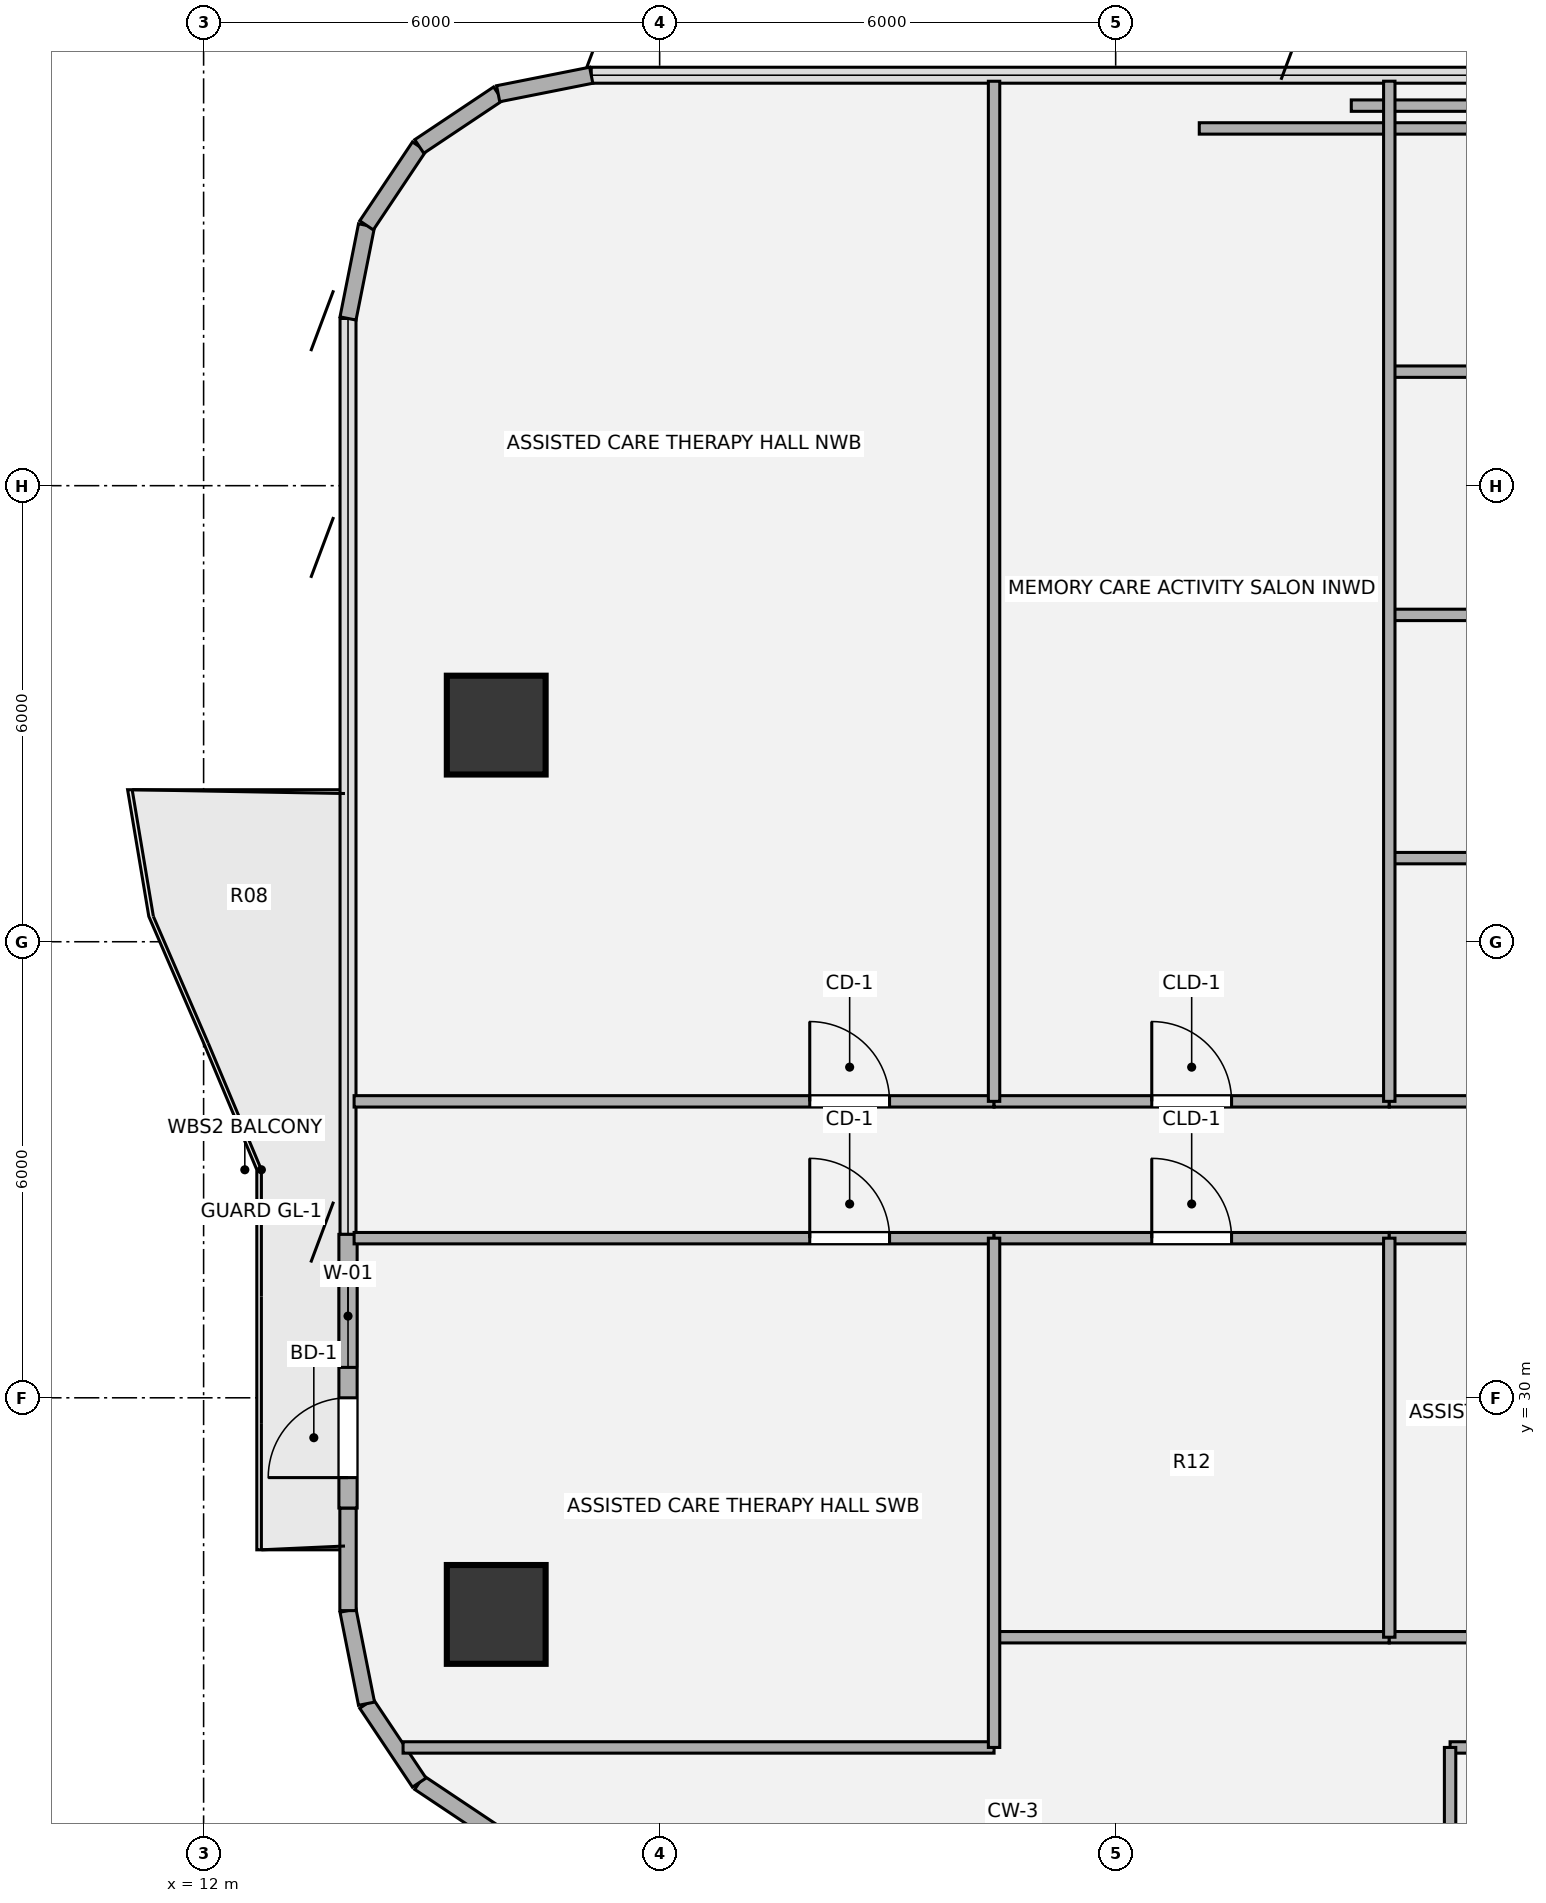
"""IFC4 building model, lengths in metres.
Left out: names, types, materials, properties, quantities, classifications, styles, units other than length and angle.
Written with IfcOpenShell. Run it as: python <this file> out.ifc"""

import sys

from ifc_helpers import new_model, si_unit, direction, frame, frame_2d, origin, origin_2d, place, context, subcontext, project, spatial, rectangle, hollow_circle, extrude, source, transform, mapped, element, fill, save


model = new_model("IFC4")
c1 = context("Model", 3, precision=1e-05, world=origin(), true_north=direction((0.0, 1.0)))
c2 = subcontext(c1, "Body", "Model", "MODEL_VIEW")
j1 = project(units=[si_unit("LENGTHUNIT", "METRE"), si_unit("PLANEANGLEUNIT", "RADIAN")], contexts=[c1])
p1 = place(None, origin())
s1 = spatial("IfcSite", under=j1, at=p1, CompositionType="ELEMENT")
p2 = place(p1, origin())
s2 = spatial("IfcBuilding", under=s1, at=p2, CompositionType="ELEMENT")
p3 = place(p2, frame((0.0, 0.0, 101.16)))
s3 = spatial("IfcBuildingStorey", under=s2, at=p3, CompositionType="ELEMENT", Elevation=101.16)
m1 = source(origin(), c2, "Body", "SweptSolid", [
    extrude(hollow_circle(Radius=0.65, WallThickness=0.045, at=origin_2d()), origin(), (0.0, 0.0, 1.0), 3.78),
])
for number, where, z_axis, x_axis in (
    (1, (15.85, 27.15, 0.0), (0.0, 0.0, 1.0), (1.0, 0.0, 0.0)),
    (2, (15.85, 38.85, 0.0), (0.0, 0.0, 1.0), (1.0, 0.0, 0.0)),
):
    element("IfcColumn", number, at=place(p3, frame(where, z_axis=z_axis, x_axis=x_axis)), inside=s3, PredefinedType="COLUMN", context=c2, shape_type="MappedRepresentation", body=[
        mapped(m1, transform((0.0, 0.0, 0.0), x_axis=(1.0, 0.0, 0.0), y_axis=(0.0, 1.0, 0.0), z_axis=(0.0, 0.0, 1.0), scale=1.0)),
    ])
for number, where, z_axis, x_axis in (
    (3, (15.875, 24.244, 0.0), (0.0, 0.0, 1.0), (-0.831, 0.556, 0.0)),
    (4, (14.837, 24.937, 0.0), (0.0, 0.0, 1.0), (-0.556, 0.831, 0.0)),
    (5, (14.144, 25.975, 0.0), (0.0, 0.0, 1.0), (-0.195, 0.981, 0.0)),
):
    element("IfcWall", number, at=place(p3, frame(where, z_axis=z_axis, x_axis=x_axis)), inside=s3, PredefinedType="SOLIDWALL", context=c2, shape_type="SweptSolid", body=[
        extrude(rectangle(XDim=1.249, YDim=0.215, at=frame_2d((0.624, 0.0))), origin(), (0.0, 0.0, 1.0), 3.53),
    ])
p4 = place(p3, frame((13.9, 27.2, 0.0), z_axis=(0.0, 0.0, 1.0), x_axis=(0.0, 1.0, 0.0)))
e6 = element("IfcWall", 6, at=p4, inside=s3, PredefinedType="SOLIDWALL", context=c2, shape_type="SweptSolid", body=[
    extrude(rectangle(XDim=1.35, YDim=0.215, at=frame_2d((0.675, 0.0))), origin(), (0.0, 0.0, 1.0), 3.53),
])
p5 = place(p3, frame((13.9, 28.55, 0.0), z_axis=(0.0, 0.0, 1.0), x_axis=(0.0, 1.0, 0.0)))
e7 = element("IfcWall", 7, at=p5, inside=s3, PredefinedType="SOLIDWALL", context=c2, shape_type="SweptSolid", body=[
    extrude(rectangle(XDim=3.6, YDim=0.24, at=frame_2d((1.8, 0.0))), origin(), (0.0, 0.0, 1.0), 3.53),
])
p6 = place(p5, frame((0.4, 0.0, 0.0)))
e8 = element("IfcOpeningElement", 8, at=p6, cuts=e7, PredefinedType="OPENING", context=c2, shape_type="SweptSolid", body=[
    extrude(rectangle(XDim=1.05, YDim=2.15, at=origin_2d()), frame((0.525, 0.13, 1.075), z_axis=(0.0, -1.0, 0.0), x_axis=(1.0, 0.0, 0.0)), (0.0, 0.0, 1.0), 0.26),
])
p7 = place(p5, frame((1.85, 0.0, 0.85)))
e9 = element("IfcOpeningElement", 9, at=p7, cuts=e7, PredefinedType="OPENING", context=c2, shape_type="SweptSolid", body=[
    extrude(rectangle(XDim=1.35, YDim=1.35, at=origin_2d()), frame((0.675, 0.13, 0.675), z_axis=(0.0, -1.0, 0.0), x_axis=(1.0, 0.0, 0.0)), (0.0, 0.0, 1.0), 0.26),
])
for number, where, z_axis, x_axis in (
    (10, (13.9, 44.2, 0.0), (0.0, 0.0, 1.0), (0.195, 0.981, 0.0)),
    (11, (14.144, 45.425, 0.0), (0.0, 0.0, 1.0), (0.556, 0.831, 0.0)),
    (12, (14.837, 46.463, 0.0), (0.0, 0.0, 1.0), (0.831, 0.556, 0.0)),
    (13, (15.875, 47.156, 0.0), (0.0, 0.0, 1.0), (0.981, 0.195, 0.0)),
):
    element("IfcWall", number, at=place(p3, frame(where, z_axis=z_axis, x_axis=x_axis)), inside=s3, PredefinedType="SOLIDWALL", context=c2, shape_type="SweptSolid", body=[
        extrude(rectangle(XDim=1.249, YDim=0.215, at=frame_2d((0.624, 0.0))), origin(), (0.0, 0.0, 1.0), 3.53),
    ])
p8 = place(p3, frame((14.624, 25.4, 0.0), z_axis=(0.0, 0.0, 1.0), x_axis=(1.0, 0.0, 0.0)))
e14 = element("IfcWall", 14, at=p8, inside=s3, PredefinedType="PARTITIONING", context=c2, shape_type="SweptSolid", body=[
    extrude(rectangle(XDim=7.776, YDim=0.15, at=frame_2d((3.888, 0.0))), origin(), (0.0, 0.0, 1.0), 3.5),
])
p9 = place(p3, frame((28.4, 25.4, 0.0), z_axis=(0.0, 0.0, 1.0), x_axis=(1.0, 0.0, 0.0)))
e15 = element("IfcWall", 15, at=p9, inside=s3, PredefinedType="PARTITIONING", context=c2, shape_type="SweptSolid", body=[
    extrude(rectangle(XDim=6.7, YDim=0.15, at=frame_2d((3.35, 0.0))), origin(), (0.0, 0.0, 1.0), 3.5),
])
p10 = place(p3, frame((22.4, 26.85, 0.0), z_axis=(0.0, 0.0, 1.0), x_axis=(1.0, 0.0, 0.0)))
e16 = element("IfcWall", 16, at=p10, inside=s3, PredefinedType="PARTITIONING", context=c2, shape_type="SweptSolid", body=[
    extrude(rectangle(XDim=5.2, YDim=0.15, at=frame_2d((2.6, 0.0))), origin(), (0.0, 0.0, 1.0), 3.055),
])
p11 = place(p3, frame((27.6, 26.85, 0.0), z_axis=(0.0, 0.0, 1.0), x_axis=(1.0, 0.0, 0.0)))
e17 = element("IfcWall", 17, at=p11, inside=s3, PredefinedType="PARTITIONING", context=c2, shape_type="SweptSolid", body=[
    extrude(rectangle(XDim=7.5, YDim=0.15, at=frame_2d((3.75, 0.0))), origin(), (0.0, 0.0, 1.0), 2.903),
])
p12 = place(p3, frame((13.98, 32.1, 0.0), z_axis=(0.0, 0.0, 1.0), x_axis=(1.0, 0.0, 0.0)))
e18 = element("IfcWall", 18, at=p12, inside=s3, PredefinedType="PARTITIONING", context=c2, shape_type="SweptSolid", body=[
    extrude(rectangle(XDim=8.42, YDim=0.15, at=frame_2d((4.21, 0.0))), origin(), (0.0, 0.0, 1.0), 2.982),
])
p13 = place(p12, frame((5.995, 0.0, 0.0)))
e19 = element("IfcOpeningElement", 19, at=p13, cuts=e18, PredefinedType="OPENING", context=c2, shape_type="SweptSolid", body=[
    extrude(rectangle(XDim=1.05, YDim=2.1, at=origin_2d()), frame((0.525, 0.085, 1.05), z_axis=(0.0, -1.0, 0.0), x_axis=(1.0, 0.0, 0.0)), (0.0, 0.0, 1.0), 0.17),
])
p14 = place(p3, frame((22.4, 32.1, 0.0), z_axis=(0.0, 0.0, 1.0), x_axis=(1.0, 0.0, 0.0)))
e20 = element("IfcWall", 20, at=p14, inside=s3, PredefinedType="PARTITIONING", context=c2, shape_type="SweptSolid", body=[
    extrude(rectangle(XDim=5.2, YDim=0.15, at=frame_2d((2.6, 0.0))), origin(), (0.0, 0.0, 1.0), 2.982),
])
p15 = place(p14, frame((2.075, 0.0, 0.0)))
e21 = element("IfcOpeningElement", 21, at=p15, cuts=e20, PredefinedType="OPENING", context=c2, shape_type="SweptSolid", body=[
    extrude(rectangle(XDim=1.05, YDim=2.1, at=origin_2d()), frame((0.525, 0.085, 1.05), z_axis=(0.0, -1.0, 0.0), x_axis=(1.0, 0.0, 0.0)), (0.0, 0.0, 1.0), 0.17),
])
p16 = place(p3, frame((27.6, 32.1, 0.0), z_axis=(0.0, 0.0, 1.0), x_axis=(1.0, 0.0, 0.0)))
e22 = element("IfcWall", 22, at=p16, inside=s3, PredefinedType="PARTITIONING", context=c2, shape_type="SweptSolid", body=[
    extrude(rectangle(XDim=7.5, YDim=0.15, at=frame_2d((3.75, 0.0))), origin(), (0.0, 0.0, 1.0), 2.982),
])
p17 = place(p3, frame((13.98, 33.9, 0.0), z_axis=(0.0, 0.0, 1.0), x_axis=(1.0, 0.0, 0.0)))
e23 = element("IfcWall", 23, at=p17, inside=s3, PredefinedType="PARTITIONING", context=c2, shape_type="SweptSolid", body=[
    extrude(rectangle(XDim=8.42, YDim=0.15, at=frame_2d((4.21, 0.0))), origin(), (0.0, 0.0, 1.0), 2.982),
])
p18 = place(p17, frame((5.995, 0.0, 0.0)))
e24 = element("IfcOpeningElement", 24, at=p18, cuts=e23, PredefinedType="OPENING", context=c2, shape_type="SweptSolid", body=[
    extrude(rectangle(XDim=1.05, YDim=2.1, at=origin_2d()), frame((0.525, 0.085, 1.05), z_axis=(0.0, -1.0, 0.0), x_axis=(1.0, 0.0, 0.0)), (0.0, 0.0, 1.0), 0.17),
])
p19 = place(p3, frame((22.4, 33.9, 0.0), z_axis=(0.0, 0.0, 1.0), x_axis=(1.0, 0.0, 0.0)))
e25 = element("IfcWall", 25, at=p19, inside=s3, PredefinedType="PARTITIONING", context=c2, shape_type="SweptSolid", body=[
    extrude(rectangle(XDim=5.2, YDim=0.15, at=frame_2d((2.6, 0.0))), origin(), (0.0, 0.0, 1.0), 2.982),
])
p20 = place(p19, frame((2.075, 0.0, 0.0)))
e26 = element("IfcOpeningElement", 26, at=p20, cuts=e25, PredefinedType="OPENING", context=c2, shape_type="SweptSolid", body=[
    extrude(rectangle(XDim=1.05, YDim=2.1, at=origin_2d()), frame((0.525, 0.085, 1.05), z_axis=(0.0, -1.0, 0.0), x_axis=(1.0, 0.0, 0.0)), (0.0, 0.0, 1.0), 0.17),
])
for number, where, z_axis, x_axis in (
    (27, (27.6, 33.9, 0.0), (0.0, 0.0, 1.0), (1.0, 0.0, 0.0)),
    (28, (27.6, 37.1, 0.0), (0.0, 0.0, 1.0), (1.0, 0.0, 0.0)),
):
    element("IfcWall", number, at=place(p3, frame(where, z_axis=z_axis, x_axis=x_axis)), inside=s3, PredefinedType="PARTITIONING", context=c2, shape_type="SweptSolid", body=[
        extrude(rectangle(XDim=7.5, YDim=0.15, at=frame_2d((3.75, 0.0))), origin(), (0.0, 0.0, 1.0), 2.982),
    ])
p21 = place(p3, frame((27.6, 40.3, 0.0), z_axis=(0.0, 0.0, 1.0), x_axis=(1.0, 0.0, 0.0)))
e29 = element("IfcWall", 29, at=p21, inside=s3, PredefinedType="PARTITIONING", context=c2, shape_type="SweptSolid", body=[
    extrude(rectangle(XDim=7.5, YDim=0.15, at=frame_2d((3.75, 0.0))), origin(), (0.0, 0.0, 1.0), 3.259),
])
p22 = place(p3, frame((27.6, 43.5, 0.0), z_axis=(0.0, 0.0, 1.0), x_axis=(1.0, 0.0, 0.0)))
e30 = element("IfcWall", 30, at=p22, inside=s3, PredefinedType="PARTITIONING", context=c2, shape_type="SweptSolid", body=[
    extrude(rectangle(XDim=7.5, YDim=0.15, at=frame_2d((3.75, 0.0))), origin(), (0.0, 0.0, 1.0), 3.308),
])
p23 = place(p3, frame((25.1, 46.7, 0.0), z_axis=(0.0, 0.0, 1.0), x_axis=(1.0, 0.0, 0.0)))
e31 = element("IfcWall", 31, at=p23, inside=s3, PredefinedType="PARTITIONING", context=c2, shape_type="SweptSolid", body=[
    extrude(rectangle(XDim=10.0, YDim=0.15, at=frame_2d((5.0, 0.0))), origin(), (0.0, 0.0, 1.0), 3.308),
])
p24 = place(p3, frame((27.1, 47.0, 0.0), z_axis=(0.0, 0.0, 1.0), x_axis=(1.0, 0.0, 0.0)))
e32 = element("IfcWall", 32, at=p24, inside=s3, PredefinedType="PARTITIONING", context=c2, shape_type="SweptSolid", body=[
    extrude(rectangle(XDim=17.8, YDim=0.15, at=frame_2d((8.9, 0.0))), origin(), (0.0, 0.0, 1.0), 3.308),
])
p25 = place(p24, frame((8.375, 0.0, 0.0)))
e33 = element("IfcOpeningElement", 33, at=p25, cuts=e32, PredefinedType="OPENING", context=c2, shape_type="SweptSolid", body=[
    extrude(rectangle(XDim=1.05, YDim=2.1, at=origin_2d()), frame((0.525, 0.085, 1.05), z_axis=(0.0, -1.0, 0.0), x_axis=(1.0, 0.0, 0.0)), (0.0, 0.0, 1.0), 0.17),
])
p26 = place(p3, frame((22.4, 25.4, 0.0), z_axis=(0.0, 0.0, 1.0), x_axis=(0.0, 1.0, 0.0)))
e34 = element("IfcWall", 34, at=p26, inside=s3, PredefinedType="PARTITIONING", context=c2, shape_type="SweptSolid", body=[
    extrude(rectangle(XDim=6.7, YDim=0.15, at=frame_2d((3.35, 0.0))), origin(), (0.0, 0.0, 1.0), 3.5),
])
p27 = place(p3, frame((22.4, 33.9, 0.0), z_axis=(0.0, 0.0, 1.0), x_axis=(0.0, 1.0, 0.0)))
e35 = element("IfcWall", 35, at=p27, inside=s3, PredefinedType="PARTITIONING", context=c2, shape_type="SweptSolid", body=[
    extrude(rectangle(XDim=13.421, YDim=0.15, at=frame_2d((6.71, 0.0))), origin(), (0.0, 0.0, 1.0), 3.5),
])
p28 = place(p3, frame((27.6, 26.85, 0.0), z_axis=(0.0, 0.0, 1.0), x_axis=(0.0, 1.0, 0.0)))
e36 = element("IfcWall", 36, at=p28, inside=s3, PredefinedType="PARTITIONING", context=c2, shape_type="SweptSolid", body=[
    extrude(rectangle(XDim=5.25, YDim=0.15, at=frame_2d((2.625, 0.0))), origin(), (0.0, 0.0, 1.0), 3.5),
])
p29 = place(p3, frame((27.6, 33.9, 0.0), z_axis=(0.0, 0.0, 1.0), x_axis=(0.0, 1.0, 0.0)))
e37 = element("IfcWall", 37, at=p29, inside=s3, PredefinedType="PARTITIONING", context=c2, shape_type="SweptSolid", body=[
    extrude(rectangle(XDim=13.421, YDim=0.15, at=frame_2d((6.711, 0.0))), origin(), (0.0, 0.0, 1.0), 3.5),
])
p30 = place(p3, frame((28.4, 21.957, 0.0), z_axis=(0.0, 0.0, 1.0), x_axis=(0.0, 1.0, 0.0)))
e38 = element("IfcWall", 38, at=p30, inside=s3, PredefinedType="PARTITIONING", context=c2, shape_type="SweptSolid", body=[
    extrude(rectangle(XDim=3.443, YDim=0.15, at=frame_2d((1.721, 0.0))), origin(), (0.0, 0.0, 1.0), 3.5),
])
m2 = source(origin(), c2, "Body", "SweptSolid", [
    extrude(rectangle(XDim=1.05, YDim=2.15, at=origin_2d()), frame((0.525, 0.025, 1.075), z_axis=(0.0, -1.0, 0.0), x_axis=(1.0, 0.0, 0.0)), (0.0, 0.0, 1.0), 0.05),
])
p31 = place(p6, origin())
e39 = element("IfcDoor", 39, at=p31, inside=s3, OperationType="SINGLE_SWING_LEFT", PredefinedType="DOOR", context=c2, shape_type="MappedRepresentation", body=[
    mapped(m2, transform((0.0, 0.0, 0.0), x_axis=(1.0, 0.0, 0.0), y_axis=(0.0, 1.0, 0.0), z_axis=(0.0, 0.0, 1.0), scale=1.0)),
])
fill(e8, e39)
m3 = source(origin(), c2, "Body", "SweptSolid", [
    extrude(rectangle(XDim=1.35, YDim=1.35, at=origin_2d()), frame((0.675, 0.03, 0.675), z_axis=(0.0, -1.0, 0.0), x_axis=(1.0, 0.0, 0.0)), (0.0, 0.0, 1.0), 0.06),
])
p32 = place(p7, origin())
e40 = element("IfcWindow", 40, at=p32, inside=s3, PartitioningType="SINGLE_PANEL", PredefinedType="WINDOW", context=c2, shape_type="MappedRepresentation", body=[
    mapped(m3, transform((0.0, 0.0, 0.0), x_axis=(1.0, 0.0, 0.0), y_axis=(0.0, 1.0, 0.0), z_axis=(0.0, 0.0, 1.0), scale=1.0)),
])
fill(e9, e40)
m4 = source(origin(), c2, "Body", "SweptSolid", [
    extrude(rectangle(XDim=1.05, YDim=2.1, at=origin_2d()), frame((0.525, 0.025, 1.05), z_axis=(0.0, -1.0, 0.0), x_axis=(1.0, 0.0, 0.0)), (0.0, 0.0, 1.0), 0.05),
])
p33 = place(p13, origin())
e41 = element("IfcDoor", 41, at=p33, inside=s3, OperationType="SINGLE_SWING_LEFT", PredefinedType="DOOR", context=c2, shape_type="MappedRepresentation", body=[
    mapped(m4, transform((0.0, 0.0, 0.0), x_axis=(1.0, 0.0, 0.0), y_axis=(0.0, 1.0, 0.0), z_axis=(0.0, 0.0, 1.0), scale=1.0)),
])
fill(e19, e41)
m5 = source(origin(), c2, "Body", "SweptSolid", [
    extrude(rectangle(XDim=1.05, YDim=2.1, at=origin_2d()), frame((0.525, 0.025, 1.05), z_axis=(0.0, -1.0, 0.0), x_axis=(1.0, 0.0, 0.0)), (0.0, 0.0, 1.0), 0.05),
])
p34 = place(p15, origin())
e42 = element("IfcDoor", 42, at=p34, inside=s3, OperationType="SINGLE_SWING_LEFT", PredefinedType="DOOR", context=c2, shape_type="MappedRepresentation", body=[
    mapped(m5, transform((0.0, 0.0, 0.0), x_axis=(1.0, 0.0, 0.0), y_axis=(0.0, 1.0, 0.0), z_axis=(0.0, 0.0, 1.0), scale=1.0)),
])
fill(e21, e42)
p35 = place(p18, origin())
e43 = element("IfcDoor", 43, at=p35, inside=s3, OperationType="SINGLE_SWING_LEFT", PredefinedType="DOOR", context=c2, shape_type="MappedRepresentation", body=[
    mapped(m4, transform((0.0, 0.0, 0.0), x_axis=(1.0, 0.0, 0.0), y_axis=(0.0, 1.0, 0.0), z_axis=(0.0, 0.0, 1.0), scale=1.0)),
])
fill(e24, e43)
p36 = place(p20, origin())
e44 = element("IfcDoor", 44, at=p36, inside=s3, OperationType="SINGLE_SWING_LEFT", PredefinedType="DOOR", context=c2, shape_type="MappedRepresentation", body=[
    mapped(m5, transform((0.0, 0.0, 0.0), x_axis=(1.0, 0.0, 0.0), y_axis=(0.0, 1.0, 0.0), z_axis=(0.0, 0.0, 1.0), scale=1.0)),
])
fill(e26, e44)
save(model, sys.argv[1])
